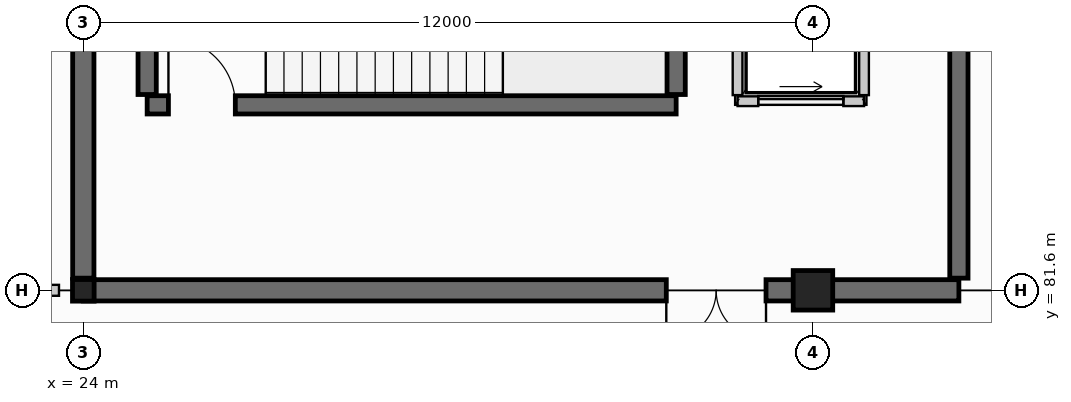
"""IFC4 building model, lengths in metres.
Left out: names, types, materials, properties, quantities, classifications, styles, units other than length and angle.
Written with IfcOpenShell. Run it as: python <this file> out.ifc"""

import sys

from ifc_helpers import new_model, si_unit, direction, frame, frame_2d, origin, origin_2d, place, context, subcontext, project, spatial, rectangle, hollow_circle, extrude, element, fill, save


model = new_model("IFC4")
c1 = context("Model", 3, precision=1e-05, world=origin(), true_north=direction((0.0, 1.0)))
c2 = subcontext(c1, "Body", "Model", "MODEL_VIEW")
j1 = project(units=[si_unit("LENGTHUNIT", "METRE"), si_unit("PLANEANGLEUNIT", "RADIAN")], contexts=[c1])
p1 = place(None, origin())
s1 = spatial("IfcSite", under=j1, at=p1, CompositionType="ELEMENT")
p2 = place(p1, origin())
s2 = spatial("IfcBuilding", under=s1, at=p2, CompositionType="ELEMENT")
p3 = place(p2, frame((0.0, 0.0, 4.8)))
s3 = spatial("IfcBuildingStorey", under=s2, at=p3, CompositionType="ELEMENT", Elevation=4.8)
p4 = place(p3, frame((24.0, 81.6, 0.0), z_axis=(0.0, 0.0, 1.0), x_axis=(1.0, 0.0, 0.0)))
e1 = element("IfcColumn", 1, at=p4, inside=s3, PredefinedType="COLUMN", context=c2, shape_type="SweptSolid", body=[
    extrude(hollow_circle(Radius=0.178, WallThickness=0.013, at=origin_2d()), origin(), (0.0, 0.0, 1.0), 4.8),
])
p5 = place(p3, frame((36.0, 81.6, 0.0), z_axis=(0.0, 0.0, 1.0), x_axis=(0.0, 1.0, 0.0)))
e2 = element("IfcColumn", 2, at=p5, inside=s3, PredefinedType="COLUMN", context=c2, shape_type="SweptSolid", body=[
    extrude(rectangle(XDim=0.65, YDim=0.65, at=origin_2d()), origin(), (0.0, 0.0, 1.0), 4.8),
])
p6 = place(p3, frame((38.4, 81.6, 0.0), z_axis=(0.0, 0.0, 1.0), x_axis=(-1.0, 0.0, 0.0)))
e3 = element("IfcWall", 3, at=p6, inside=s3, PredefinedType="SHEAR", context=c2, shape_type="SweptSolid", body=[
    extrude(rectangle(XDim=14.4, YDim=0.35, at=frame_2d((7.2, 0.0))), origin(), (0.0, 0.0, 1.0), 4.8),
])
p7 = place(p6, frame((3.172, 0.0, 0.0)))
e4 = element("IfcOpeningElement", 4, at=p7, cuts=e3, PredefinedType="OPENING", context=c2, shape_type="SweptSolid", body=[
    extrude(rectangle(XDim=1.64, YDim=2.2, at=frame_2d((0.82, 1.1))), frame((0.0, 0.185, 0.0), z_axis=(0.0, -1.0, 0.0), x_axis=(1.0, 0.0, 0.0)), (0.0, 0.0, 1.0), 0.37),
])
p8 = place(p3, frame((24.0, 81.8, 0.0), z_axis=(0.0, 0.0, 1.0), x_axis=(0.0, 1.0, 0.0)))
e5 = element("IfcWall", 5, at=p8, inside=s3, PredefinedType="SHEAR", context=c2, shape_type="SweptSolid", body=[
    extrude(rectangle(XDim=8.0, YDim=0.35, at=frame_2d((4.0, 0.0))), origin(), (0.0, 0.0, 1.0), 4.8),
])
p9 = place(p3, frame((38.4, 89.8, 0.0), z_axis=(0.0, 0.0, 1.0), x_axis=(0.0, -1.0, 0.0)))
e6 = element("IfcWall", 6, at=p9, inside=s3, PredefinedType="SHEAR", context=c2, shape_type="SweptSolid", body=[
    extrude(rectangle(XDim=8.0, YDim=0.3, at=frame_2d((4.0, 0.0))), origin(), (0.0, 0.0, 1.0), 4.8),
])
p10 = place(p3, frame((25.05, 84.65, 0.0), z_axis=(0.0, 0.0, 1.0), x_axis=(1.0, 0.0, 0.0)))
e7 = element("IfcWall", 7, at=p10, inside=s3, PredefinedType="SHEAR", context=c2, shape_type="SweptSolid", body=[
    extrude(rectangle(XDim=8.7, YDim=0.3, at=frame_2d((4.35, 0.0))), origin(), (0.0, 0.0, 1.0), 4.8),
])
p11 = place(p10, frame((0.35, 0.0, 0.0)))
e8 = element("IfcOpeningElement", 8, at=p11, cuts=e7, PredefinedType="OPENING", context=c2, shape_type="SweptSolid", body=[
    extrude(rectangle(XDim=1.1, YDim=2.15, at=frame_2d((0.55, 1.075))), frame((0.0, 0.16, 0.0), z_axis=(0.0, -1.0, 0.0), x_axis=(1.0, 0.0, 0.0)), (0.0, 0.0, 1.0), 0.32),
])
for number, where, z_axis, x_axis in (
    (9, (25.05, 84.82, 0.0), (0.0, 0.0, 1.0), (0.0, 1.0, 0.0)),
    (10, (33.75, 84.82, 0.0), (0.0, 0.0, 1.0), (0.0, 1.0, 0.0)),
):
    element("IfcWall", number, at=place(p3, frame(where, z_axis=z_axis, x_axis=x_axis)), inside=s3, PredefinedType="SHEAR", context=c2, shape_type="SweptSolid", body=[
        extrude(rectangle(XDim=3.76, YDim=0.3, at=frame_2d((1.88, 0.0))), origin(), (0.0, 0.0, 1.0), 4.8),
    ])
p12 = place(p3, frame((34.76, 84.71, 0.0), z_axis=(0.0, 0.0, 1.0), x_axis=(1.0, 0.0, 0.0)))
e11 = element("IfcWall", 11, at=p12, inside=s3, PredefinedType="PARTITIONING", context=c2, shape_type="SweptSolid", body=[
    extrude(rectangle(XDim=2.08, YDim=0.16, at=frame_2d((1.04, 0.0))), origin(), (0.0, 0.0, 1.0), 4.43),
])
p13 = place(p12, frame((0.34, 0.0, 0.0)))
e12 = element("IfcOpeningElement", 12, at=p13, cuts=e11, PredefinedType="OPENING", context=c2, shape_type="SweptSolid", body=[
    extrude(rectangle(XDim=1.4, YDim=2.2, at=frame_2d((0.7, 1.1))), frame((0.0, 0.09, 0.0), z_axis=(0.0, -1.0, 0.0), x_axis=(1.0, 0.0, 0.0)), (0.0, 0.0, 1.0), 0.18),
])
for number, where, z_axis, x_axis in (
    (13, (34.76, 87.59, 0.0), (0.0, 0.0, 1.0), (0.0, -1.0, 0.0)),
    (14, (36.84, 84.81, 0.0), (0.0, 0.0, 1.0), (0.0, 1.0, 0.0)),
):
    element("IfcWall", number, at=place(p3, frame(where, z_axis=z_axis, x_axis=x_axis)), inside=s3, PredefinedType="PARTITIONING", context=c2, shape_type="SweptSolid", body=[
        extrude(rectangle(XDim=2.78, YDim=0.16, at=frame_2d((1.39, 0.0))), origin(), (0.0, 0.0, 1.0), 4.43),
    ])
p14 = place(p3, frame((20.7, 81.6, 0.0), z_axis=(0.0, 0.0, 1.0), x_axis=(1.0, 0.0, 0.0)))
e15 = element("IfcWall", 15, at=p14, inside=s3, PredefinedType="PARTITIONING", context=c2, shape_type="SweptSolid", body=[
    extrude(rectangle(XDim=2.9, YDim=0.18, at=frame_2d((1.45, 0.0))), origin(), (0.0, 0.0, 1.0), 3.958),
])
p15 = place(p14, frame((0.8, 0.0, 0.0)))
e16 = element("IfcOpeningElement", 16, at=p15, cuts=e15, PredefinedType="OPENING", context=c2, shape_type="SweptSolid", body=[
    extrude(rectangle(XDim=1.48, YDim=2.26, at=frame_2d((0.74, 1.13))), frame((0.0, 0.1, 0.0), z_axis=(0.0, -1.0, 0.0), x_axis=(1.0, 0.0, 0.0)), (0.0, 0.0, 1.0), 0.2),
])
p16 = place(p13, origin())
e17 = element("IfcDoor", 17, at=p16, inside=s3, OperationType="SLIDING_TO_LEFT", PredefinedType="DOOR", context=c2, shape_type="SweptSolid", body=[
    extrude(rectangle(XDim=1.4, YDim=2.2, at=frame_2d((0.7, 1.1))), frame((0.0, 0.025, 0.0), z_axis=(0.0, -1.0, 0.0), x_axis=(1.0, 0.0, 0.0)), (0.0, 0.0, 1.0), 0.05),
])
fill(e12, e17)
p17 = place(p11, origin())
e18 = element("IfcDoor", 18, at=p17, inside=s3, OperationType="SINGLE_SWING_LEFT", PredefinedType="DOOR", context=c2, shape_type="SweptSolid", body=[
    extrude(rectangle(XDim=1.1, YDim=2.15, at=frame_2d((0.55, 1.075))), frame((0.0, 0.025, 0.0), z_axis=(0.0, -1.0, 0.0), x_axis=(1.0, 0.0, 0.0)), (0.0, 0.0, 1.0), 0.05),
])
fill(e8, e18)
p18 = place(p7, origin())
e19 = element("IfcDoor", 19, at=p18, inside=s3, OperationType="DOUBLE_DOOR_SINGLE_SWING", PredefinedType="DOOR", context=c2, shape_type="SweptSolid", body=[
    extrude(rectangle(XDim=1.64, YDim=2.2, at=frame_2d((0.82, 1.1))), frame((0.0, 0.025, 0.0), z_axis=(0.0, -1.0, 0.0), x_axis=(1.0, 0.0, 0.0)), (0.0, 0.0, 1.0), 0.05),
])
fill(e4, e19)
save(model, sys.argv[1])
